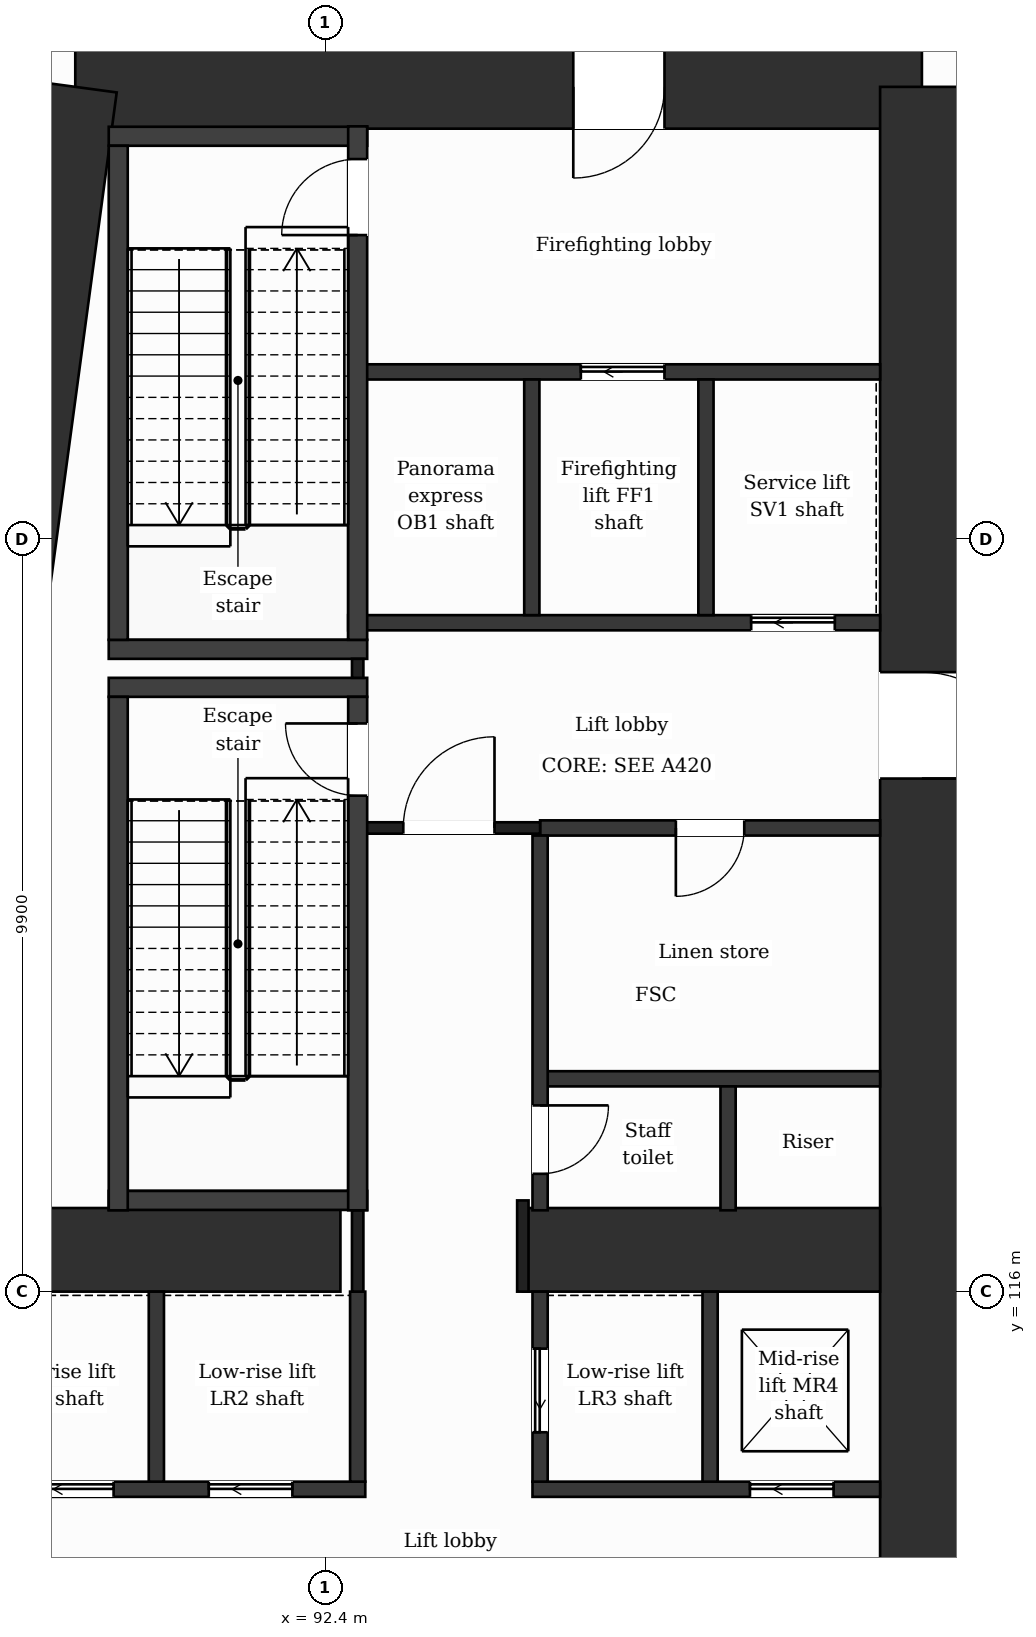
"""IFC4 building model, lengths in metres.
Left out: names, types, materials, properties, quantities, classifications, styles, units other than length and angle.
Written with IfcOpenShell. Run it as: python <this file> out.ifc"""

import sys

from ifc_helpers import new_model, si_unit, direction, frame, frame_2d, origin, place, context, subcontext, project, spatial, rectangle, extrude, element, fill, save


model = new_model("IFC4")
c1 = context("Model", 3, precision=1e-05, world=origin(), true_north=direction((0.0, 1.0)))
c2 = subcontext(c1, "Body", "Model", "MODEL_VIEW")
j1 = project(units=[si_unit("LENGTHUNIT", "METRE"), si_unit("PLANEANGLEUNIT", "RADIAN")], contexts=[c1])
p1 = place(None, origin())
s1 = spatial("IfcSite", under=j1, at=p1, CompositionType="ELEMENT")
p2 = place(p1, origin())
s2 = spatial("IfcBuilding", under=s1, at=p2, CompositionType="ELEMENT")
p3 = place(p2, frame((0.0, 0.0, 86.0)))
s3 = spatial("IfcBuildingStorey", under=s2, at=p3, CompositionType="ELEMENT", Elevation=86.0)
p4 = place(p3, frame((89.112, 131.85, 0.0), z_axis=(0.0, 0.0, 1.0), x_axis=(1.0, 0.0, 0.0)))
e1 = element("IfcWall", 1, at=p4, inside=s3, PredefinedType="SHEAR", context=c2, shape_type="SweptSolid", body=[
    extrude(rectangle(XDim=11.138, YDim=1.1, at=frame_2d((5.569, 0.0))), origin(), (0.0, 0.0, 1.0), 5.0),
])
p5 = place(p4, frame((6.552, 0.0, 0.0)))
e2 = element("IfcOpeningElement", 2, at=p5, cuts=e1, PredefinedType="OPENING", context=c2, shape_type="SweptSolid", body=[
    extrude(rectangle(XDim=1.2, YDim=2.1, at=frame_2d((0.6, 1.05))), frame((0.0, 0.56, 0.0), z_axis=(0.0, -1.0, 0.0), x_axis=(1.0, 0.0, 0.0)), (0.0, 0.0, 1.0), 1.12),
])
p6 = place(p3, frame((100.25, 131.85, 0.0), z_axis=(0.0, 0.0, 1.0), x_axis=(0.0, -1.0, 0.0)))
e3 = element("IfcWall", 3, at=p6, inside=s3, PredefinedType="SHEAR", context=c2, shape_type="SweptSolid", body=[
    extrude(rectangle(XDim=20.9, YDim=1.1, at=frame_2d((10.45, 0.0))), origin(), (0.0, 0.0, 1.0), 5.0),
])
p7 = place(p6, frame((7.7, 0.0, 0.0)))
e4 = element("IfcOpeningElement", 4, at=p7, cuts=e3, PredefinedType="OPENING", context=c2, shape_type="SweptSolid", body=[
    extrude(rectangle(XDim=1.4, YDim=2.1, at=frame_2d((0.7, 1.05))), frame((0.0, 0.56, 0.0), z_axis=(0.0, -1.0, 0.0), x_axis=(1.0, 0.0, 0.0)), (0.0, 0.0, 1.0), 1.12),
])
p8 = place(p3, frame((86.298, 110.95, 0.0), z_axis=(0.0, 0.0, 1.0), x_axis=(0.133400422634, 0.99106222168, 0.0)))
e5 = element("IfcWall", 5, at=p8, inside=s3, PredefinedType="SHEAR", context=c2, shape_type="SweptSolid", body=[
    extrude(rectangle(XDim=21.089, YDim=1.1, at=frame_2d((10.544, 0.0))), origin(), (0.0, 0.0, 1.0), 5.0),
])
p9 = place(p3, frame((87.523, 116.55, 0.0), z_axis=(0.0, 0.0, 1.0), x_axis=(1.0, 0.0, 0.0)))
e6 = element("IfcWall", 6, at=p9, inside=s3, PredefinedType="SHEAR", context=c2, shape_type="SweptSolid", body=[
    extrude(rectangle(XDim=5.077, YDim=1.1, at=frame_2d((2.539, 0.0))), origin(), (0.0, 0.0, 1.0), 5.0),
])
p10 = place(p3, frame((95.0, 116.55, 0.0), z_axis=(0.0, 0.0, 1.0), x_axis=(1.0, 0.0, 0.0)))
e7 = element("IfcWall", 7, at=p10, inside=s3, PredefinedType="SHEAR", context=c2, shape_type="SweptSolid", body=[
    extrude(rectangle(XDim=4.7, YDim=1.1, at=frame_2d((2.35, 0.0))), origin(), (0.0, 0.0, 1.0), 5.0),
])
p11 = place(p3, frame((87.153, 113.4, 0.0), z_axis=(0.0, 0.0, 1.0), x_axis=(1.0, 0.0, 0.0)))
e8 = element("IfcWall", 8, at=p11, inside=s3, PredefinedType="PARTITIONING", context=c2, shape_type="SweptSolid", body=[
    extrude(rectangle(XDim=5.774, YDim=0.2, at=frame_2d((2.887, 0.0))), origin(), (0.0, 0.0, 1.0), 4.68),
])
p12 = place(p11, frame((1.363, 0.0, 0.0)))
e9 = element("IfcOpeningElement", 9, at=p12, cuts=e8, PredefinedType="OPENING", context=c2, shape_type="SweptSolid", body=[
    extrude(rectangle(XDim=1.1, YDim=2.1, at=frame_2d((0.55, 1.05))), frame((0.0, 0.11, 0.0), z_axis=(0.0, -1.0, 0.0), x_axis=(1.0, 0.0, 0.0)), (0.0, 0.0, 1.0), 0.22),
])
p13 = place(p11, frame((3.715, 0.0, 0.0)))
e10 = element("IfcOpeningElement", 10, at=p13, cuts=e8, PredefinedType="OPENING", context=c2, shape_type="SweptSolid", body=[
    extrude(rectangle(XDim=1.1, YDim=2.1, at=frame_2d((0.55, 1.05))), frame((0.0, 0.11, 0.0), z_axis=(0.0, -1.0, 0.0), x_axis=(1.0, 0.0, 0.0)), (0.0, 0.0, 1.0), 0.22),
])
p14 = place(p3, frame((95.127, 113.4, 0.0), z_axis=(0.0, 0.0, 1.0), x_axis=(1.0, 0.0, 0.0)))
e11 = element("IfcWall", 11, at=p14, inside=s3, PredefinedType="PARTITIONING", context=c2, shape_type="SweptSolid", body=[
    extrude(rectangle(XDim=4.573, YDim=0.2, at=frame_2d((2.287, 0.0))), origin(), (0.0, 0.0, 1.0), 4.68),
])
p15 = place(p14, frame((2.861, 0.0, 0.0)))
e12 = element("IfcOpeningElement", 12, at=p15, cuts=e11, PredefinedType="OPENING", context=c2, shape_type="SweptSolid", body=[
    extrude(rectangle(XDim=1.1, YDim=2.1, at=frame_2d((0.55, 1.05))), frame((0.0, 0.11, 0.0), z_axis=(0.0, -1.0, 0.0), x_axis=(1.0, 0.0, 0.0)), (0.0, 0.0, 1.0), 0.22),
])
p16 = place(p3, frame((89.552, 117.2, 0.0), z_axis=(0.0, 0.0, 1.0), x_axis=(1.0, 0.0, 0.0)))
e13 = element("IfcWall", 13, at=p16, inside=s3, PredefinedType="PARTITIONING", context=c2, shape_type="SweptSolid", body=[
    extrude(rectangle(XDim=3.4, YDim=0.25, at=frame_2d((1.7, 0.0))), origin(), (0.0, 0.0, 1.0), 4.68),
])
p17 = place(p3, frame((95.227, 118.8, 0.0), z_axis=(0.0, 0.0, 1.0), x_axis=(1.0, 0.0, 0.0)))
e14 = element("IfcWall", 14, at=p17, inside=s3, PredefinedType="PARTITIONING", context=c2, shape_type="SweptSolid", body=[
    extrude(rectangle(XDim=4.473, YDim=0.2, at=frame_2d((2.236, 0.0))), origin(), (0.0, 0.0, 1.0), 4.68),
])
p18 = place(p3, frame((95.227, 122.1, 0.0), z_axis=(0.0, 0.0, 1.0), x_axis=(1.0, 0.0, 0.0)))
e15 = element("IfcWall", 15, at=p18, inside=s3, PredefinedType="PARTITIONING", context=c2, shape_type="SweptSolid", body=[
    extrude(rectangle(XDim=4.473, YDim=0.2, at=frame_2d((2.236, 0.0))), origin(), (0.0, 0.0, 1.0), 4.68),
])
p19 = place(p18, frame((1.786, 0.0, 0.0)))
e16 = element("IfcOpeningElement", 16, at=p19, cuts=e15, PredefinedType="OPENING", context=c2, shape_type="SweptSolid", body=[
    extrude(rectangle(XDim=0.9, YDim=2.1, at=frame_2d((0.45, 1.05))), frame((0.0, 0.11, 0.0), z_axis=(0.0, -1.0, 0.0), x_axis=(1.0, 0.0, 0.0)), (0.0, 0.0, 1.0), 0.22),
])
p20 = place(p3, frame((92.827, 122.1, 0.0), z_axis=(0.0, 0.0, 1.0), x_axis=(1.0, 0.0, 0.0)))
e17 = element("IfcWall", 17, at=p20, inside=s3, PredefinedType="PARTITIONING", context=c2, shape_type="SweptSolid", body=[
    extrude(rectangle(XDim=2.4, YDim=0.15, at=frame_2d((1.2, 0.0))), origin(), (0.0, 0.0, 1.0), 4.68),
])
p21 = place(p20, frame((0.6, 0.0, 0.0)))
e18 = element("IfcOpeningElement", 18, at=p21, cuts=e17, PredefinedType="OPENING", context=c2, shape_type="SweptSolid", body=[
    extrude(rectangle(XDim=1.2, YDim=2.1, at=frame_2d((0.6, 1.05))), frame((0.0, 0.085, 0.0), z_axis=(0.0, -1.0, 0.0), x_axis=(1.0, 0.0, 0.0)), (0.0, 0.0, 1.0), 0.17),
])
for number, where, z_axis, x_axis in (
    (19, (89.552, 123.95, 0.0), (0.0, 0.0, 1.0), (1.0, 0.0, 0.0)),
    (20, (89.552, 124.45, 0.0), (0.0, 0.0, 1.0), (1.0, 0.0, 0.0)),
):
    element("IfcWall", number, at=place(p3, frame(where, z_axis=z_axis, x_axis=x_axis)), inside=s3, PredefinedType="PARTITIONING", context=c2, shape_type="SweptSolid", body=[
        extrude(rectangle(XDim=3.4, YDim=0.25, at=frame_2d((1.7, 0.0))), origin(), (0.0, 0.0, 1.0), 4.68),
    ])
p22 = place(p3, frame((92.702, 124.8, 0.0), z_axis=(0.0, 0.0, 1.0), x_axis=(1.0, 0.0, 0.0)))
e21 = element("IfcWall", 21, at=p22, inside=s3, PredefinedType="PARTITIONING", context=c2, shape_type="SweptSolid", body=[
    extrude(rectangle(XDim=6.998, YDim=0.2, at=frame_2d((3.499, 0.0))), origin(), (0.0, 0.0, 1.0), 4.68),
])
p23 = place(p22, frame((5.302, 0.0, 0.0)))
e22 = element("IfcOpeningElement", 22, at=p23, cuts=e21, PredefinedType="OPENING", context=c2, shape_type="SweptSolid", body=[
    extrude(rectangle(XDim=1.1, YDim=2.1, at=frame_2d((0.55, 1.05))), frame((0.0, 0.11, 0.0), z_axis=(0.0, -1.0, 0.0), x_axis=(1.0, 0.0, 0.0)), (0.0, 0.0, 1.0), 0.22),
])
p24 = place(p3, frame((92.827, 128.1, 0.0), z_axis=(0.0, 0.0, 1.0), x_axis=(1.0, 0.0, 0.0)))
e23 = element("IfcWall", 23, at=p24, inside=s3, PredefinedType="PARTITIONING", context=c2, shape_type="SweptSolid", body=[
    extrude(rectangle(XDim=6.873, YDim=0.2, at=frame_2d((3.437, 0.0))), origin(), (0.0, 0.0, 1.0), 4.68),
])
p25 = place(p24, frame((2.936, 0.0, 0.0)))
e24 = element("IfcOpeningElement", 24, at=p25, cuts=e23, PredefinedType="OPENING", context=c2, shape_type="SweptSolid", body=[
    extrude(rectangle(XDim=1.1, YDim=2.1, at=frame_2d((0.55, 1.05))), frame((0.0, 0.11, 0.0), z_axis=(0.0, -1.0, 0.0), x_axis=(1.0, 0.0, 0.0)), (0.0, 0.0, 1.0), 0.22),
])
p26 = place(p3, frame((89.552, 131.2, 0.0), z_axis=(0.0, 0.0, 1.0), x_axis=(1.0, 0.0, 0.0)))
e25 = element("IfcWall", 25, at=p26, inside=s3, PredefinedType="PARTITIONING", context=c2, shape_type="SweptSolid", body=[
    extrude(rectangle(XDim=3.4, YDim=0.25, at=frame_2d((1.7, 0.0))), origin(), (0.0, 0.0, 1.0), 4.68),
])
p27 = place(p3, frame((89.677, 117.07, 0.0), z_axis=(0.0, 0.0, 1.0), x_axis=(0.0, 1.0, 0.0)))
e26 = element("IfcWall", 26, at=p27, inside=s3, PredefinedType="PARTITIONING", context=c2, shape_type="SweptSolid", body=[
    extrude(rectangle(XDim=6.755, YDim=0.25, at=frame_2d((3.377, 0.0))), origin(), (0.0, 0.0, 1.0), 4.68),
])
p28 = place(p3, frame((89.677, 124.575, 0.0), z_axis=(0.0, 0.0, 1.0), x_axis=(0.0, 1.0, 0.0)))
e27 = element("IfcWall", 27, at=p28, inside=s3, PredefinedType="PARTITIONING", context=c2, shape_type="SweptSolid", body=[
    extrude(rectangle(XDim=6.5, YDim=0.25, at=frame_2d((3.25, 0.0))), origin(), (0.0, 0.0, 1.0), 4.68),
])
for number, where, z_axis, x_axis in (
    (28, (90.178, 113.5, 0.0), (0.0, 0.0, 1.0), (0.0, 1.0, 0.0)),
    (29, (92.827, 113.5, 0.0), (0.0, 0.0, 1.0), (0.0, 1.0, 0.0)),
):
    element("IfcWall", number, at=place(p3, frame(where, z_axis=z_axis, x_axis=x_axis)), inside=s3, PredefinedType="PARTITIONING", context=c2, shape_type="SweptSolid", body=[
        extrude(rectangle(XDim=2.5, YDim=0.2, at=frame_2d((1.25, 0.0))), origin(), (0.0, 0.0, 1.0), 4.68),
    ])
p29 = place(p3, frame((92.827, 116.0, 0.0), z_axis=(0.0, 0.0, 1.0), x_axis=(0.0, 1.0, 0.0)))
e30 = element("IfcWall", 30, at=p29, inside=s3, PredefinedType="PARTITIONING", context=c2, shape_type="SweptSolid", body=[
    extrude(rectangle(XDim=1.07, YDim=0.15, at=frame_2d((0.535, 0.0))), origin(), (0.0, 0.0, 1.0), 4.68),
])
p30 = place(p3, frame((92.827, 124.075, 0.0), z_axis=(0.0, 0.0, 1.0), x_axis=(0.0, 1.0, 0.0)))
e31 = element("IfcWall", 31, at=p30, inside=s3, PredefinedType="PARTITIONING", context=c2, shape_type="SweptSolid", body=[
    extrude(rectangle(XDim=0.25, YDim=0.15, at=frame_2d((0.125, 0.0))), origin(), (0.0, 0.0, 1.0), 4.68),
])
p31 = place(p3, frame((92.827, 117.07, 0.0), z_axis=(0.0, 0.0, 1.0), x_axis=(0.0, 1.0, 0.0)))
e32 = element("IfcWall", 32, at=p31, inside=s3, PredefinedType="PARTITIONING", context=c2, shape_type="SweptSolid", body=[
    extrude(rectangle(XDim=6.755, YDim=0.25, at=frame_2d((3.377, 0.0))), origin(), (0.0, 0.0, 1.0), 4.68),
])
p32 = place(p31, frame((5.455, 0.0, 0.0)))
e33 = element("IfcOpeningElement", 33, at=p32, cuts=e32, PredefinedType="OPENING", context=c2, shape_type="SweptSolid", body=[
    extrude(rectangle(XDim=0.95, YDim=2.1, at=frame_2d((0.475, 1.05))), frame((0.0, 0.135, 0.0), z_axis=(0.0, -1.0, 0.0), x_axis=(1.0, 0.0, 0.0)), (0.0, 0.0, 1.0), 0.27),
])
p33 = place(p3, frame((92.827, 124.575, 0.0), z_axis=(0.0, 0.0, 1.0), x_axis=(0.0, 1.0, 0.0)))
e34 = element("IfcWall", 34, at=p33, inside=s3, PredefinedType="PARTITIONING", context=c2, shape_type="SweptSolid", body=[
    extrude(rectangle(XDim=6.755, YDim=0.25, at=frame_2d((3.377, 0.0))), origin(), (0.0, 0.0, 1.0), 4.68),
])
p34 = place(p33, frame((5.325, 0.0, 0.0)))
e35 = element("IfcOpeningElement", 35, at=p34, cuts=e34, PredefinedType="OPENING", context=c2, shape_type="SweptSolid", body=[
    extrude(rectangle(XDim=1.0, YDim=2.1, at=frame_2d((0.5, 1.05))), frame((0.0, 0.135, 0.0), z_axis=(0.0, -1.0, 0.0), x_axis=(1.0, 0.0, 0.0)), (0.0, 0.0, 1.0), 0.27),
])
p35 = place(p3, frame((95.0, 116.0, 0.0), z_axis=(0.0, 0.0, 1.0), x_axis=(0.0, 1.0, 0.0)))
e36 = element("IfcWall", 36, at=p35, inside=s3, PredefinedType="PARTITIONING", context=c2, shape_type="SweptSolid", body=[
    extrude(rectangle(XDim=1.2, YDim=0.15, at=frame_2d((0.6, 0.0))), origin(), (0.0, 0.0, 1.0), 4.68),
])
p36 = place(p3, frame((95.118, 124.9, 0.0), z_axis=(0.0, 0.0, 1.0), x_axis=(0.0, 1.0, 0.0)))
e37 = element("IfcWall", 37, at=p36, inside=s3, PredefinedType="PARTITIONING", context=c2, shape_type="SweptSolid", body=[
    extrude(rectangle(XDim=3.1, YDim=0.2, at=frame_2d((1.55, 0.0))), origin(), (0.0, 0.0, 1.0), 4.68),
])
p37 = place(p3, frame((95.227, 113.5, 0.0), z_axis=(0.0, 0.0, 1.0), x_axis=(0.0, 1.0, 0.0)))
e38 = element("IfcWall", 38, at=p37, inside=s3, PredefinedType="PARTITIONING", context=c2, shape_type="SweptSolid", body=[
    extrude(rectangle(XDim=2.5, YDim=0.2, at=frame_2d((1.25, 0.0))), origin(), (0.0, 0.0, 1.0), 4.68),
])
p38 = place(p37, frame((0.65, 0.0, 0.0)))
e39 = element("IfcOpeningElement", 39, at=p38, cuts=e38, PredefinedType="OPENING", context=c2, shape_type="SweptSolid", body=[
    extrude(rectangle(XDim=1.1, YDim=2.1, at=frame_2d((0.55, 1.05))), frame((0.0, 0.11, 0.0), z_axis=(0.0, -1.0, 0.0), x_axis=(1.0, 0.0, 0.0)), (0.0, 0.0, 1.0), 0.22),
])
p39 = place(p3, frame((95.227, 117.07, 0.0), z_axis=(0.0, 0.0, 1.0), x_axis=(0.0, 1.0, 0.0)))
e40 = element("IfcWall", 40, at=p39, inside=s3, PredefinedType="PARTITIONING", context=c2, shape_type="SweptSolid", body=[
    extrude(rectangle(XDim=4.93, YDim=0.2, at=frame_2d((2.465, 0.0))), origin(), (0.0, 0.0, 1.0), 4.68),
])
p40 = place(p39, frame((0.48, 0.0, 0.0)))
e41 = element("IfcOpeningElement", 41, at=p40, cuts=e40, PredefinedType="OPENING", context=c2, shape_type="SweptSolid", body=[
    extrude(rectangle(XDim=0.9, YDim=2.1, at=frame_2d((0.45, 1.05))), frame((0.0, 0.11, 0.0), z_axis=(0.0, -1.0, 0.0), x_axis=(1.0, 0.0, 0.0)), (0.0, 0.0, 1.0), 0.22),
])
p41 = place(p3, frame((97.409, 124.9, 0.0), z_axis=(0.0, 0.0, 1.0), x_axis=(0.0, 1.0, 0.0)))
e42 = element("IfcWall", 42, at=p41, inside=s3, PredefinedType="PARTITIONING", context=c2, shape_type="SweptSolid", body=[
    extrude(rectangle(XDim=3.1, YDim=0.2, at=frame_2d((1.55, 0.0))), origin(), (0.0, 0.0, 1.0), 4.68),
])
p42 = place(p3, frame((97.463, 113.5, 0.0), z_axis=(0.0, 0.0, 1.0), x_axis=(0.0, 1.0, 0.0)))
e43 = element("IfcWall", 43, at=p42, inside=s3, PredefinedType="PARTITIONING", context=c2, shape_type="SweptSolid", body=[
    extrude(rectangle(XDim=2.5, YDim=0.2, at=frame_2d((1.25, 0.0))), origin(), (0.0, 0.0, 1.0), 4.68),
])
p43 = place(p3, frame((97.7, 117.07, 0.0), z_axis=(0.0, 0.0, 1.0), x_axis=(0.0, 1.0, 0.0)))
e44 = element("IfcWall", 44, at=p43, inside=s3, PredefinedType="PARTITIONING", context=c2, shape_type="SweptSolid", body=[
    extrude(rectangle(XDim=1.63, YDim=0.2, at=frame_2d((0.815, 0.0))), origin(), (0.0, 0.0, 1.0), 4.68),
])
p44 = place(p21, origin())
e45 = element("IfcDoor", 45, at=p44, inside=s3, OperationType="SINGLE_SWING_RIGHT", PredefinedType="DOOR", context=c2, shape_type="SweptSolid", body=[
    extrude(rectangle(XDim=1.2, YDim=2.1, at=frame_2d((0.6, 1.05))), frame((0.0, 0.025, 0.0), z_axis=(0.0, -1.0, 0.0), x_axis=(1.0, 0.0, 0.0)), (0.0, 0.0, 1.0), 0.05),
])
fill(e18, e45)
p45 = place(p25, origin())
e46 = element("IfcDoor", 46, at=p45, inside=s3, OperationType="SLIDING_TO_LEFT", PredefinedType="DOOR", context=c2, shape_type="SweptSolid", body=[
    extrude(rectangle(XDim=1.1, YDim=2.1, at=frame_2d((0.55, 1.05))), frame((0.0, 0.025, 0.0), z_axis=(0.0, -1.0, 0.0), x_axis=(1.0, 0.0, 0.0)), (0.0, 0.0, 1.0), 0.05),
])
fill(e24, e46)
p46 = place(p23, origin())
e47 = element("IfcDoor", 47, at=p46, inside=s3, OperationType="SLIDING_TO_LEFT", PredefinedType="DOOR", context=c2, shape_type="SweptSolid", body=[
    extrude(rectangle(XDim=1.1, YDim=2.1, at=frame_2d((0.55, 1.05))), frame((0.0, 0.025, 0.0), z_axis=(0.0, -1.0, 0.0), x_axis=(1.0, 0.0, 0.0)), (0.0, 0.0, 1.0), 0.05),
])
fill(e22, e47)
p47 = place(p19, origin())
e48 = element("IfcDoor", 48, at=p47, inside=s3, OperationType="SINGLE_SWING_LEFT", PredefinedType="DOOR", context=c2, shape_type="SweptSolid", body=[
    extrude(rectangle(XDim=0.9, YDim=2.1, at=frame_2d((0.45, 1.05))), frame((0.0, 0.025, 0.0), z_axis=(0.0, -1.0, 0.0), x_axis=(1.0, 0.0, 0.0)), (0.0, 0.0, 1.0), 0.05),
])
fill(e16, e48)
p48 = place(p32, origin())
e49 = element("IfcDoor", 49, at=p48, inside=s3, OperationType="SINGLE_SWING_RIGHT", PredefinedType="DOOR", context=c2, shape_type="SweptSolid", body=[
    extrude(rectangle(XDim=0.95, YDim=2.1, at=frame_2d((0.475, 1.05))), frame((0.0, 0.025, 0.0), z_axis=(0.0, -1.0, 0.0), x_axis=(1.0, 0.0, 0.0)), (0.0, 0.0, 1.0), 0.05),
])
fill(e33, e49)
p49 = place(p34, origin())
e50 = element("IfcDoor", 50, at=p49, inside=s3, OperationType="SINGLE_SWING_LEFT", PredefinedType="DOOR", context=c2, shape_type="SweptSolid", body=[
    extrude(rectangle(XDim=1.0, YDim=2.1, at=frame_2d((0.5, 1.05))), frame((0.0, 0.025, 0.0), z_axis=(0.0, -1.0, 0.0), x_axis=(1.0, 0.0, 0.0)), (0.0, 0.0, 1.0), 0.05),
])
fill(e35, e50)
p50 = place(p40, origin())
e51 = element("IfcDoor", 51, at=p50, inside=s3, OperationType="SINGLE_SWING_RIGHT", PredefinedType="DOOR", context=c2, shape_type="SweptSolid", body=[
    extrude(rectangle(XDim=0.9, YDim=2.1, at=frame_2d((0.45, 1.05))), frame((0.0, 0.025, 0.0), z_axis=(0.0, -1.0, 0.0), x_axis=(1.0, 0.0, 0.0)), (0.0, 0.0, 1.0), 0.05),
])
fill(e41, e51)
p51 = place(p12, origin())
e52 = element("IfcDoor", 52, at=p51, inside=s3, OperationType="SLIDING_TO_LEFT", PredefinedType="DOOR", context=c2, shape_type="SweptSolid", body=[
    extrude(rectangle(XDim=1.1, YDim=2.1, at=frame_2d((0.55, 1.05))), frame((0.0, 0.025, 0.0), z_axis=(0.0, -1.0, 0.0), x_axis=(1.0, 0.0, 0.0)), (0.0, 0.0, 1.0), 0.05),
])
fill(e9, e52)
p52 = place(p13, origin())
e53 = element("IfcDoor", 53, at=p52, inside=s3, OperationType="SLIDING_TO_LEFT", PredefinedType="DOOR", context=c2, shape_type="SweptSolid", body=[
    extrude(rectangle(XDim=1.1, YDim=2.1, at=frame_2d((0.55, 1.05))), frame((0.0, 0.025, 0.0), z_axis=(0.0, -1.0, 0.0), x_axis=(1.0, 0.0, 0.0)), (0.0, 0.0, 1.0), 0.05),
])
fill(e10, e53)
p53 = place(p38, origin())
e54 = element("IfcDoor", 54, at=p53, inside=s3, OperationType="SLIDING_TO_LEFT", PredefinedType="DOOR", context=c2, shape_type="SweptSolid", body=[
    extrude(rectangle(XDim=1.1, YDim=2.1, at=frame_2d((0.55, 1.05))), frame((0.0, 0.025, 0.0), z_axis=(0.0, -1.0, 0.0), x_axis=(1.0, 0.0, 0.0)), (0.0, 0.0, 1.0), 0.05),
])
fill(e39, e54)
p54 = place(p15, origin())
e55 = element("IfcDoor", 55, at=p54, inside=s3, OperationType="SLIDING_TO_LEFT", PredefinedType="DOOR", context=c2, shape_type="SweptSolid", body=[
    extrude(rectangle(XDim=1.1, YDim=2.1, at=frame_2d((0.55, 1.05))), frame((0.0, 0.025, 0.0), z_axis=(0.0, -1.0, 0.0), x_axis=(1.0, 0.0, 0.0)), (0.0, 0.0, 1.0), 0.05),
])
fill(e12, e55)
p55 = place(p5, origin())
e56 = element("IfcDoor", 56, at=p55, inside=s3, OperationType="SINGLE_SWING_LEFT", PredefinedType="DOOR", context=c2, shape_type="SweptSolid", body=[
    extrude(rectangle(XDim=1.2, YDim=2.1, at=frame_2d((0.6, 1.05))), frame((0.0, 0.025, 0.0), z_axis=(0.0, -1.0, 0.0), x_axis=(1.0, 0.0, 0.0)), (0.0, 0.0, 1.0), 0.05),
])
fill(e2, e56)
p56 = place(p7, origin())
e57 = element("IfcDoor", 57, at=p56, inside=s3, OperationType="SINGLE_SWING_RIGHT", PredefinedType="DOOR", context=c2, shape_type="SweptSolid", body=[
    extrude(rectangle(XDim=1.4, YDim=2.1, at=frame_2d((0.7, 1.05))), frame((0.0, 0.025, 0.0), z_axis=(0.0, -1.0, 0.0), x_axis=(1.0, 0.0, 0.0)), (0.0, 0.0, 1.0), 0.05),
])
fill(e4, e57)
save(model, sys.argv[1])
